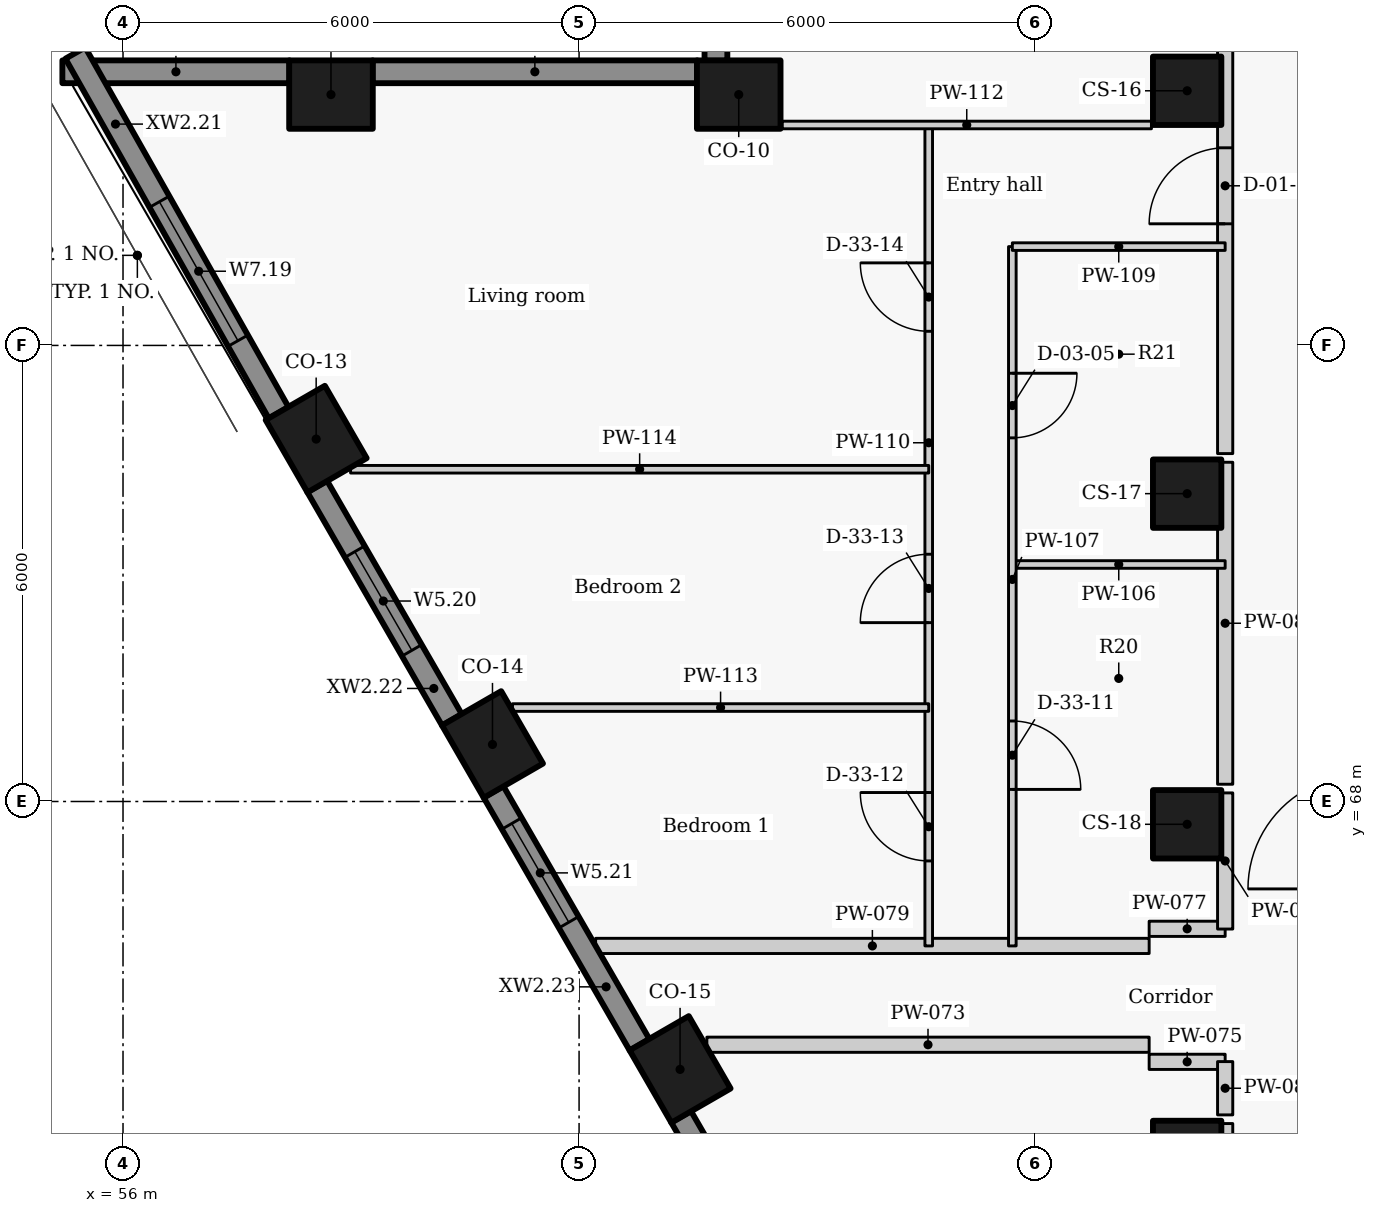
"""IFC4 building model, lengths in metres.
Left out: names, types, materials, properties, quantities, classifications, styles, units other than length and angle.
Written with IfcOpenShell. Run it as: python <this file> out.ifc"""

import sys

from ifc_helpers import new_model, si_unit, direction, frame, frame_2d, origin, origin_2d, place, context, subcontext, project, spatial, rectangle, extrude, element, fill, save


model = new_model("IFC4")
c1 = context("Model", 3, precision=1e-05, world=origin(), true_north=direction((0.0, 1.0)))
c2 = subcontext(c1, "Body", "Model", "MODEL_VIEW")
j1 = project(units=[si_unit("LENGTHUNIT", "METRE"), si_unit("PLANEANGLEUNIT", "RADIAN")], contexts=[c1])
p1 = place(None, origin())
s1 = spatial("IfcSite", under=j1, at=p1, CompositionType="ELEMENT")
p2 = place(p1, origin())
s2 = spatial("IfcBuilding", under=s1, at=p2, CompositionType="ELEMENT")
p3 = place(p2, frame((0.0, 0.0, 229.5)))
s3 = spatial("IfcBuildingStorey", under=s2, at=p3, CompositionType="ELEMENT", Elevation=229.5)
for number, where, z_axis, x_axis in (
    (1, (64.101, 77.3, 0.0), (0.0, 0.0, 1.0), (-1.0, 0.0, 0.0)),
    (2, (58.736, 77.3, 0.0), (0.0, 0.0, 1.0), (-1.0, 0.0, 0.0)),
    (3, (58.541, 72.768, 0.0), (0.0, 0.0, 1.0), (0.5, -0.866, 0.0)),
    (4, (60.861, 68.75, 0.0), (0.0, 0.0, 1.0), (0.5, -0.866, 0.0)),
    (5, (63.329, 64.475, 0.0), (0.0, 0.0, 1.0), (0.5, -0.866, 0.0)),
):
    element("IfcColumn", number, at=place(p3, frame(where, z_axis=z_axis, x_axis=x_axis)), inside=s3, PredefinedType="COLUMN", context=c2, shape_type="SweptSolid", body=[
        extrude(rectangle(XDim=1.1, YDim=0.9, at=origin_2d()), origin(), (0.0, 0.0, 1.0), 3.3),
    ])
for number, where, z_axis, x_axis in (
    (6, (70.0, 77.35, 0.0), (0.0, 0.0, 1.0), (0.0, -1.0, 0.0)),
    (7, (70.0, 72.05, 0.0), (0.0, 0.0, 1.0), (0.0, -1.0, 0.0)),
    (8, (70.0, 67.7, 0.0), (0.0, 0.0, 1.0), (0.0, -1.0, 0.0)),
    (9, (70.0, 63.35, 0.0), (0.0, 0.0, 1.0), (0.0, -1.0, 0.0)),
):
    element("IfcColumn", number, at=place(p3, frame(where, z_axis=z_axis, x_axis=x_axis)), inside=s3, PredefinedType="COLUMN", context=c2, shape_type="SweptSolid", body=[
        extrude(rectangle(XDim=0.9, YDim=0.9, at=origin_2d()), origin(), (0.0, 0.0, 1.0), 3.3),
    ])
p4 = place(p3, frame((63.801, 82.154, 0.0), z_axis=(0.0, 0.0, 1.0), x_axis=(0.0, -1.0, 0.0)))
e10 = element("IfcWall", 10, at=p4, inside=s3, PredefinedType="SOLIDWALL", context=c2, shape_type="SweptSolid", body=[
    extrude(rectangle(XDim=4.408, YDim=0.3, at=frame_2d((2.204, 0.0))), origin(), (0.0, 0.0, 1.0), 2.425),
])
p5 = place(p4, frame((1.154, 0.0, 0.9)))
e11 = element("IfcOpeningElement", 11, at=p5, cuts=e10, PredefinedType="OPENING", context=c2, shape_type="SweptSolid", body=[
    extrude(rectangle(XDim=2.1, YDim=1.1, at=frame_2d((1.05, 0.55))), frame((0.0, 0.16, 0.0), z_axis=(0.0, -1.0, 0.0), x_axis=(1.0, 0.0, 0.0)), (0.0, 0.0, 1.0), 0.32),
])
p6 = place(p3, frame((63.554, 77.6, 0.0), z_axis=(0.0, 0.0, 1.0), x_axis=(-1.0, 0.0, 0.0)))
e12 = element("IfcWall", 12, at=p6, inside=s3, PredefinedType="SOLIDWALL", context=c2, shape_type="SweptSolid", body=[
    extrude(rectangle(XDim=4.272, YDim=0.3, at=frame_2d((2.136, 0.0))), origin(), (0.0, 0.0, 1.0), 2.425),
])
p7 = place(p3, frame((58.19, 77.6, 0.0), z_axis=(0.0, 0.0, 1.0), x_axis=(-1.0, 0.0, 0.0)))
e13 = element("IfcWall", 13, at=p7, inside=s3, PredefinedType="SOLIDWALL", context=c2, shape_type="SweptSolid", body=[
    extrude(rectangle(XDim=2.988, YDim=0.3, at=frame_2d((1.494, 0.0))), origin(), (0.0, 0.0, 1.0), 2.425),
])
p8 = place(p3, frame((55.373, 77.846, 0.0), z_axis=(0.0, 0.0, 1.0), x_axis=(0.492080931903, -0.870549456641, 0.0)))
e14 = element("IfcWall", 14, at=p8, inside=s3, PredefinedType="SOLIDWALL", context=c2, shape_type="SweptSolid", body=[
    extrude(rectangle(XDim=5.437, YDim=0.3, at=frame_2d((2.718, 0.0))), origin(), (0.0, 0.0, 1.0), 2.425),
])
p9 = place(p8, frame((2.247, 0.0, 0.9)))
e15 = element("IfcOpeningElement", 15, at=p9, cuts=e14, PredefinedType="OPENING", context=c2, shape_type="SweptSolid", body=[
    extrude(rectangle(XDim=2.1, YDim=1.1, at=frame_2d((1.05, 0.55))), frame((0.0, 0.16, 0.0), z_axis=(0.0, -1.0, 0.0), x_axis=(1.0, 0.0, 0.0)), (0.0, 0.0, 1.0), 0.32),
])
p10 = place(p3, frame((58.554, 72.145, 0.0), z_axis=(0.0, 0.0, 1.0), x_axis=(0.500010404316, -0.866019396766, 0.0)))
e16 = element("IfcWall", 16, at=p10, inside=s3, PredefinedType="SOLIDWALL", context=c2, shape_type="SweptSolid", body=[
    extrude(rectangle(XDim=3.547, YDim=0.3, at=frame_2d((1.774, 0.0))), origin(), (0.0, 0.0, 1.0), 2.425),
])
p11 = place(p10, frame((0.991, 0.0, 0.9)))
e17 = element("IfcOpeningElement", 17, at=p11, cuts=e16, PredefinedType="OPENING", context=c2, shape_type="SweptSolid", body=[
    extrude(rectangle(XDim=1.5, YDim=1.1, at=frame_2d((0.75, 0.55))), frame((0.0, 0.16, 0.0), z_axis=(0.0, -1.0, 0.0), x_axis=(1.0, 0.0, 0.0)), (0.0, 0.0, 1.0), 0.32),
])
p12 = place(p3, frame((60.874, 68.127, 0.0), z_axis=(0.0, 0.0, 1.0), x_axis=(0.499984490703, -0.866034357896, 0.0)))
e18 = element("IfcWall", 18, at=p12, inside=s3, PredefinedType="SOLIDWALL", context=c2, shape_type="SweptSolid", body=[
    extrude(rectangle(XDim=3.844, YDim=0.3, at=frame_2d((1.922, 0.0))), origin(), (0.0, 0.0, 1.0), 2.425),
])
p13 = place(p12, frame((0.482, 0.0, 0.9)))
e19 = element("IfcOpeningElement", 19, at=p13, cuts=e18, PredefinedType="OPENING", context=c2, shape_type="SweptSolid", body=[
    extrude(rectangle(XDim=1.5, YDim=1.1, at=frame_2d((0.75, 0.55))), frame((0.0, 0.16, 0.0), z_axis=(0.0, -1.0, 0.0), x_axis=(1.0, 0.0, 0.0)), (0.0, 0.0, 1.0), 0.32),
])
p14 = place(p3, frame((63.342, 63.853, 0.0), z_axis=(0.0, 0.0, 1.0), x_axis=(0.500011218404, -0.866018926739, 0.0)))
e20 = element("IfcWall", 20, at=p14, inside=s3, PredefinedType="SOLIDWALL", context=c2, shape_type="SweptSolid", body=[
    extrude(rectangle(XDim=3.879, YDim=0.3, at=frame_2d((1.939, 0.0))), origin(), (0.0, 0.0, 1.0), 2.425),
])
p15 = place(p14, frame((0.878, 0.0, 0.9)))
e21 = element("IfcOpeningElement", 21, at=p15, cuts=e20, PredefinedType="OPENING", context=c2, shape_type="SweptSolid", body=[
    extrude(rectangle(XDim=2.1, YDim=1.1, at=frame_2d((1.05, 0.55))), frame((0.0, 0.16, 0.0), z_axis=(0.0, -1.0, 0.0), x_axis=(1.0, 0.0, 0.0)), (0.0, 0.0, 1.0), 0.32),
])
p16 = place(p3, frame((63.681, 64.8, 0.0), z_axis=(0.0, 0.0, 1.0), x_axis=(1.0, 0.0, 0.0)))
e22 = element("IfcWall", 22, at=p16, inside=s3, PredefinedType="PARTITIONING", context=c2, shape_type="SweptSolid", body=[
    extrude(rectangle(XDim=5.819, YDim=0.2, at=frame_2d((2.909, 0.0))), origin(), (0.0, 0.0, 1.0), 3.025),
])
for number, where, z_axis, x_axis in (
    (23, (69.5, 64.575, 0.0), (0.0, 0.0, 1.0), (1.0, 0.0, 0.0)),
    (24, (69.5, 66.325, 0.0), (0.0, 0.0, 1.0), (1.0, 0.0, 0.0)),
):
    element("IfcWall", number, at=place(p3, frame(where, z_axis=z_axis, x_axis=x_axis)), inside=s3, PredefinedType="PARTITIONING", context=c2, shape_type="SweptSolid", body=[
        extrude(rectangle(XDim=1.0, YDim=0.2, at=frame_2d((0.5, 0.0))), origin(), (0.0, 0.0, 1.0), 2.505),
    ])
p17 = place(p3, frame((62.218, 66.1, 0.0), z_axis=(0.0, 0.0, 1.0), x_axis=(1.0, 0.0, 0.0)))
e25 = element("IfcWall", 25, at=p17, inside=s3, PredefinedType="PARTITIONING", context=c2, shape_type="SweptSolid", body=[
    extrude(rectangle(XDim=7.282, YDim=0.2, at=frame_2d((3.641, 0.0))), origin(), (0.0, 0.0, 1.0), 2.405),
])
p18 = place(p3, frame((70.5, 59.527, 0.0), z_axis=(0.0, 0.0, 1.0), x_axis=(0.0, 1.0, 0.0)))
e26 = element("IfcWall", 26, at=p18, inside=s3, PredefinedType="PARTITIONING", context=c2, shape_type="SweptSolid", body=[
    extrude(rectangle(XDim=4.236, YDim=0.2, at=frame_2d((2.118, 0.0))), origin(), (0.0, 0.0, 1.0), 3.025),
])
p19 = place(p18, frame((1.618, 0.0, 0.0)))
e27 = element("IfcOpeningElement", 27, at=p19, cuts=e26, PredefinedType="OPENING", context=c2, shape_type="SweptSolid", body=[
    extrude(rectangle(XDim=1.0, YDim=2.1, at=frame_2d((0.5, 1.05))), frame((0.0, 0.11, 0.0), z_axis=(0.0, -1.0, 0.0), x_axis=(1.0, 0.0, 0.0)), (0.0, 0.0, 1.0), 0.22),
])
p20 = place(p3, frame((70.5, 63.877, 0.0), z_axis=(0.0, 0.0, 1.0), x_axis=(0.0, 1.0, 0.0)))
e28 = element("IfcWall", 28, at=p20, inside=s3, PredefinedType="PARTITIONING", context=c2, shape_type="SweptSolid", body=[
    extrude(rectangle(XDim=0.701, YDim=0.2, at=frame_2d((0.351, 0.0))), origin(), (0.0, 0.0, 1.0), 3.025),
])
p21 = place(p3, frame((70.5, 66.322, 0.0), z_axis=(0.0, 0.0, 1.0), x_axis=(0.0, 1.0, 0.0)))
e29 = element("IfcWall", 29, at=p21, inside=s3, PredefinedType="PARTITIONING", context=c2, shape_type="SweptSolid", body=[
    extrude(rectangle(XDim=1.791, YDim=0.2, at=frame_2d((0.896, 0.0))), origin(), (0.0, 0.0, 1.0), 3.025),
])
p22 = place(p3, frame((70.5, 68.227, 0.0), z_axis=(0.0, 0.0, 1.0), x_axis=(0.0, 1.0, 0.0)))
e30 = element("IfcWall", 30, at=p22, inside=s3, PredefinedType="PARTITIONING", context=c2, shape_type="SweptSolid", body=[
    extrude(rectangle(XDim=4.236, YDim=0.2, at=frame_2d((2.118, 0.0))), origin(), (0.0, 0.0, 1.0), 3.025),
])
p23 = place(p3, frame((70.5, 72.577, 0.0), z_axis=(0.0, 0.0, 1.0), x_axis=(0.0, 1.0, 0.0)))
e31 = element("IfcWall", 31, at=p23, inside=s3, PredefinedType="PARTITIONING", context=c2, shape_type="SweptSolid", body=[
    extrude(rectangle(XDim=20.051, YDim=0.2, at=frame_2d((10.025, 0.0))), origin(), (0.0, 0.0, 1.0), 3.025),
])
p24 = place(p23, frame((3.023, 0.0, 0.0)))
e32 = element("IfcOpeningElement", 32, at=p24, cuts=e31, PredefinedType="OPENING", context=c2, shape_type="SweptSolid", body=[
    extrude(rectangle(XDim=1.0, YDim=2.1, at=frame_2d((0.5, 1.05))), frame((0.0, 0.11, 0.0), z_axis=(0.0, -1.0, 0.0), x_axis=(1.0, 0.0, 0.0)), (0.0, 0.0, 1.0), 0.22),
])
p25 = place(p23, frame((6.923, 0.0, 0.0)))
e33 = element("IfcOpeningElement", 33, at=p25, cuts=e31, PredefinedType="OPENING", context=c2, shape_type="SweptSolid", body=[
    extrude(rectangle(XDim=1.0, YDim=2.1, at=frame_2d((0.5, 1.05))), frame((0.0, 0.11, 0.0), z_axis=(0.0, -1.0, 0.0), x_axis=(1.0, 0.0, 0.0)), (0.0, 0.0, 1.0), 0.22),
])
p26 = place(p23, frame((10.823, 0.0, 0.0)))
e34 = element("IfcOpeningElement", 34, at=p26, cuts=e31, PredefinedType="OPENING", context=c2, shape_type="SweptSolid", body=[
    extrude(rectangle(XDim=1.0, YDim=2.1, at=frame_2d((0.5, 1.05))), frame((0.0, 0.11, 0.0), z_axis=(0.0, -1.0, 0.0), x_axis=(1.0, 0.0, 0.0)), (0.0, 0.0, 1.0), 0.22),
])
p27 = place(p3, frame((67.7, 71.118, 0.0), z_axis=(0.0, 0.0, 1.0), x_axis=(1.0, 0.0, 0.0)))
e35 = element("IfcWall", 35, at=p27, inside=s3, PredefinedType="PARTITIONING", context=c2, shape_type="SweptSolid", body=[
    extrude(rectangle(XDim=2.8, YDim=0.1, at=frame_2d((1.4, 0.0))), origin(), (0.0, 0.0, 1.0), 2.505),
])
p28 = place(p3, frame((67.7, 75.3, 0.0), z_axis=(0.0, 0.0, 1.0), x_axis=(0.0, -1.0, 0.0)))
e36 = element("IfcWall", 36, at=p28, inside=s3, PredefinedType="PARTITIONING", context=c2, shape_type="SweptSolid", body=[
    extrude(rectangle(XDim=9.2, YDim=0.1, at=frame_2d((4.6, 0.0))), origin(), (0.0, 0.0, 1.0), 3.025),
])
p29 = place(p28, frame((6.241, 0.0, 0.0)))
e37 = element("IfcOpeningElement", 37, at=p29, cuts=e36, PredefinedType="OPENING", context=c2, shape_type="SweptSolid", body=[
    extrude(rectangle(XDim=0.9, YDim=2.1, at=frame_2d((0.45, 1.05))), frame((0.0, 0.06, 0.0), z_axis=(0.0, -1.0, 0.0), x_axis=(1.0, 0.0, 0.0)), (0.0, 0.0, 1.0), 0.12),
])
p30 = place(p28, frame((1.666, 0.0, 0.0)))
e38 = element("IfcOpeningElement", 38, at=p30, cuts=e36, PredefinedType="OPENING", context=c2, shape_type="SweptSolid", body=[
    extrude(rectangle(XDim=0.85, YDim=2.1, at=frame_2d((0.425, 1.05))), frame((0.0, 0.06, 0.0), z_axis=(0.0, -1.0, 0.0), x_axis=(1.0, 0.0, 0.0)), (0.0, 0.0, 1.0), 0.12),
])
p31 = place(p3, frame((67.7, 75.3, 0.0), z_axis=(0.0, 0.0, 1.0), x_axis=(1.0, 0.0, 0.0)))
e39 = element("IfcWall", 39, at=p31, inside=s3, PredefinedType="PARTITIONING", context=c2, shape_type="SweptSolid", body=[
    extrude(rectangle(XDim=2.8, YDim=0.1, at=frame_2d((1.4, 0.0))), origin(), (0.0, 0.0, 1.0), 2.505),
])
p32 = place(p3, frame((66.6, 66.1, 0.0), z_axis=(0.0, 0.0, 1.0), x_axis=(0.0, 1.0, 0.0)))
e40 = element("IfcWall", 40, at=p32, inside=s3, PredefinedType="PARTITIONING", context=c2, shape_type="SweptSolid", body=[
    extrude(rectangle(XDim=10.8, YDim=0.1, at=frame_2d((5.4, 0.0))), origin(), (0.0, 0.0, 1.0), 3.025),
])
p33 = place(p32, frame((1.118, 0.0, 0.0)))
e41 = element("IfcOpeningElement", 41, at=p33, cuts=e40, PredefinedType="OPENING", context=c2, shape_type="SweptSolid", body=[
    extrude(rectangle(XDim=0.9, YDim=2.1, at=frame_2d((0.45, 1.05))), frame((0.0, 0.06, 0.0), z_axis=(0.0, -1.0, 0.0), x_axis=(1.0, 0.0, 0.0)), (0.0, 0.0, 1.0), 0.12),
])
p34 = place(p32, frame((4.253, 0.0, 0.0)))
e42 = element("IfcOpeningElement", 42, at=p34, cuts=e40, PredefinedType="OPENING", context=c2, shape_type="SweptSolid", body=[
    extrude(rectangle(XDim=0.9, YDim=2.1, at=frame_2d((0.45, 1.05))), frame((0.0, 0.06, 0.0), z_axis=(0.0, -1.0, 0.0), x_axis=(1.0, 0.0, 0.0)), (0.0, 0.0, 1.0), 0.12),
])
p35 = place(p32, frame((8.086, 0.0, 0.0)))
e43 = element("IfcOpeningElement", 43, at=p35, cuts=e40, PredefinedType="OPENING", context=c2, shape_type="SweptSolid", body=[
    extrude(rectangle(XDim=0.9, YDim=2.1, at=frame_2d((0.45, 1.05))), frame((0.0, 0.06, 0.0), z_axis=(0.0, -1.0, 0.0), x_axis=(1.0, 0.0, 0.0)), (0.0, 0.0, 1.0), 0.12),
])
p36 = place(p3, frame((64.67, 76.9, 0.0), z_axis=(0.0, 0.0, 1.0), x_axis=(1.0, 0.0, 0.0)))
e44 = element("IfcWall", 44, at=p36, inside=s3, PredefinedType="PARTITIONING", context=c2, shape_type="SweptSolid", body=[
    extrude(rectangle(XDim=4.86, YDim=0.1, at=frame_2d((2.43, 0.0))), origin(), (0.0, 0.0, 1.0), 3.025),
])
p37 = place(p3, frame((61.123, 69.236, 0.0), z_axis=(0.0, 0.0, 1.0), x_axis=(1.0, 0.0, 0.0)))
e45 = element("IfcWall", 45, at=p37, inside=s3, PredefinedType="PARTITIONING", context=c2, shape_type="SweptSolid", body=[
    extrude(rectangle(XDim=5.477, YDim=0.1, at=frame_2d((2.738, 0.0))), origin(), (0.0, 0.0, 1.0), 3.025),
])
p38 = place(p3, frame((58.994, 72.371, 0.0), z_axis=(0.0, 0.0, 1.0), x_axis=(1.0, 0.0, 0.0)))
e46 = element("IfcWall", 46, at=p38, inside=s3, PredefinedType="PARTITIONING", context=c2, shape_type="SweptSolid", body=[
    extrude(rectangle(XDim=7.606, YDim=0.1, at=frame_2d((3.803, 0.0))), origin(), (0.0, 0.0, 1.0), 3.025),
])
p39 = place(p9, origin())
e47 = element("IfcWindow", 47, at=p39, inside=s3, PartitioningType="SINGLE_PANEL", PredefinedType="WINDOW", context=c2, shape_type="SweptSolid", body=[
    extrude(rectangle(XDim=2.1, YDim=1.1, at=frame_2d((1.05, 0.55))), frame((0.0, 0.03, 0.0), z_axis=(0.0, -1.0, 0.0), x_axis=(1.0, 0.0, 0.0)), (0.0, 0.0, 1.0), 0.06),
])
fill(e15, e47)
p40 = place(p11, origin())
e48 = element("IfcWindow", 48, at=p40, inside=s3, PartitioningType="SINGLE_PANEL", PredefinedType="WINDOW", context=c2, shape_type="SweptSolid", body=[
    extrude(rectangle(XDim=1.5, YDim=1.1, at=frame_2d((0.75, 0.55))), frame((0.0, 0.03, 0.0), z_axis=(0.0, -1.0, 0.0), x_axis=(1.0, 0.0, 0.0)), (0.0, 0.0, 1.0), 0.06),
])
fill(e17, e48)
p41 = place(p13, origin())
e49 = element("IfcWindow", 49, at=p41, inside=s3, PartitioningType="SINGLE_PANEL", PredefinedType="WINDOW", context=c2, shape_type="SweptSolid", body=[
    extrude(rectangle(XDim=1.5, YDim=1.1, at=frame_2d((0.75, 0.55))), frame((0.0, 0.03, 0.0), z_axis=(0.0, -1.0, 0.0), x_axis=(1.0, 0.0, 0.0)), (0.0, 0.0, 1.0), 0.06),
])
fill(e19, e49)
p42 = place(p24, origin())
e50 = element("IfcDoor", 50, at=p42, inside=s3, OperationType="SINGLE_SWING_LEFT", PredefinedType="DOOR", context=c2, shape_type="SweptSolid", body=[
    extrude(rectangle(XDim=1.0, YDim=2.1, at=frame_2d((0.5, 1.05))), frame((0.0, 0.025, 0.0), z_axis=(0.0, -1.0, 0.0), x_axis=(1.0, 0.0, 0.0)), (0.0, 0.0, 1.0), 0.05),
])
fill(e32, e50)
p43 = place(p29, origin())
e51 = element("IfcDoor", 51, at=p43, inside=s3, OperationType="SINGLE_SWING_RIGHT", PredefinedType="DOOR", context=c2, shape_type="SweptSolid", body=[
    extrude(rectangle(XDim=0.9, YDim=2.1, at=frame_2d((0.45, 1.05))), frame((0.0, 0.025, 0.0), z_axis=(0.0, -1.0, 0.0), x_axis=(1.0, 0.0, 0.0)), (0.0, 0.0, 1.0), 0.05),
])
fill(e37, e51)
p44 = place(p30, origin())
e52 = element("IfcDoor", 52, at=p44, inside=s3, OperationType="SINGLE_SWING_LEFT", PredefinedType="DOOR", context=c2, shape_type="SweptSolid", body=[
    extrude(rectangle(XDim=0.85, YDim=2.1, at=frame_2d((0.425, 1.05))), frame((0.0, 0.025, 0.0), z_axis=(0.0, -1.0, 0.0), x_axis=(1.0, 0.0, 0.0)), (0.0, 0.0, 1.0), 0.05),
])
fill(e38, e52)
p45 = place(p33, origin())
e53 = element("IfcDoor", 53, at=p45, inside=s3, OperationType="SINGLE_SWING_RIGHT", PredefinedType="DOOR", context=c2, shape_type="SweptSolid", body=[
    extrude(rectangle(XDim=0.9, YDim=2.1, at=frame_2d((0.45, 1.05))), frame((0.0, 0.025, 0.0), z_axis=(0.0, -1.0, 0.0), x_axis=(1.0, 0.0, 0.0)), (0.0, 0.0, 1.0), 0.05),
])
fill(e41, e53)
p46 = place(p34, origin())
e54 = element("IfcDoor", 54, at=p46, inside=s3, OperationType="SINGLE_SWING_LEFT", PredefinedType="DOOR", context=c2, shape_type="SweptSolid", body=[
    extrude(rectangle(XDim=0.9, YDim=2.1, at=frame_2d((0.45, 1.05))), frame((0.0, 0.025, 0.0), z_axis=(0.0, -1.0, 0.0), x_axis=(1.0, 0.0, 0.0)), (0.0, 0.0, 1.0), 0.05),
])
fill(e42, e54)
p47 = place(p35, origin())
e55 = element("IfcDoor", 55, at=p47, inside=s3, OperationType="SINGLE_SWING_RIGHT", PredefinedType="DOOR", context=c2, shape_type="SweptSolid", body=[
    extrude(rectangle(XDim=0.9, YDim=2.1, at=frame_2d((0.45, 1.05))), frame((0.0, 0.025, 0.0), z_axis=(0.0, -1.0, 0.0), x_axis=(1.0, 0.0, 0.0)), (0.0, 0.0, 1.0), 0.05),
])
fill(e43, e55)
save(model, sys.argv[1])
